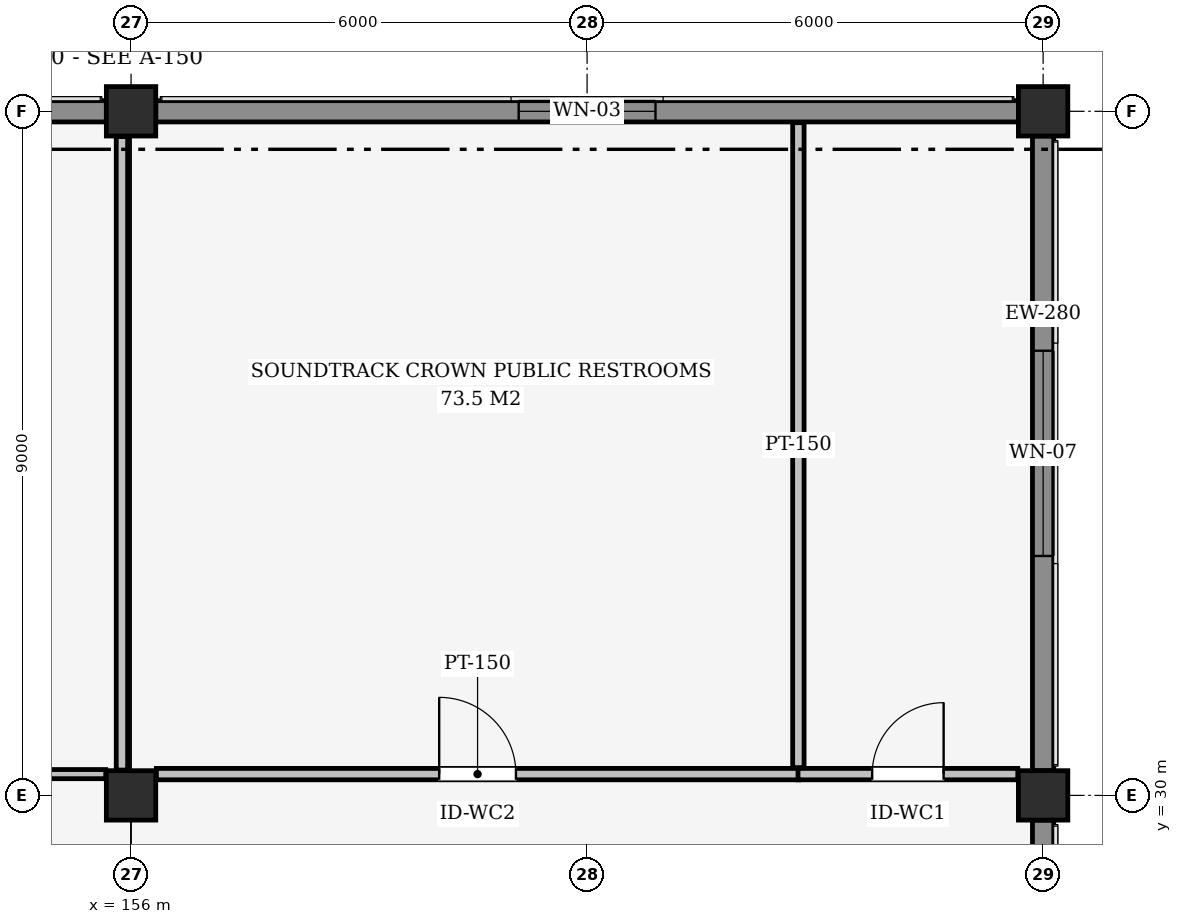
"""IFC4 building model, lengths in metres.
Left out: names, types, materials, properties, quantities, classifications, styles, units other than length and angle.
Written with IfcOpenShell. Run it as: python <this file> out.ifc"""

import sys

from ifc_helpers import new_model, si_unit, direction, frame, frame_2d, origin, origin_2d, place, context, subcontext, project, spatial, rectangle, extrude, element, fill, save


model = new_model("IFC4")
c1 = context("Model", 3, precision=1e-05, world=origin(), true_north=direction((0.0, 1.0)))
c2 = subcontext(c1, "Body", "Model", "MODEL_VIEW")
j1 = project(units=[si_unit("LENGTHUNIT", "METRE"), si_unit("PLANEANGLEUNIT", "RADIAN")], contexts=[c1])
p1 = place(None, origin())
s1 = spatial("IfcSite", under=j1, at=p1, CompositionType="ELEMENT")
p2 = place(p1, origin())
s2 = spatial("IfcBuilding", under=s1, at=p2, CompositionType="ELEMENT")
p3 = place(p2, frame((0.0, 0.0, 18.3)))
s3 = spatial("IfcBuildingStorey", under=s2, at=p3, CompositionType="ELEMENT", Elevation=18.3)
for number, where, z_axis, x_axis in (
    (1, (156.0, 30.0, 0.0), (0.0, 0.0, 1.0), (1.0, 0.0, 0.0)),
    (2, (156.0, 39.0, 0.0), (0.0, 0.0, 1.0), (1.0, 0.0, 0.0)),
    (3, (168.0, 30.0, 0.0), (0.0, 0.0, 1.0), (1.0, 0.0, 0.0)),
    (4, (168.0, 39.0, 0.0), (0.0, 0.0, 1.0), (1.0, 0.0, 0.0)),
):
    element("IfcColumn", number, at=place(p3, frame(where, z_axis=z_axis, x_axis=x_axis)), inside=s3, PredefinedType="COLUMN", context=c2, shape_type="SweptSolid", body=[
        extrude(rectangle(XDim=0.65, YDim=0.65, at=origin_2d()), origin(), (0.0, 0.0, 1.0), 3.9),
    ])
p4 = place(p3, frame((144.325, 39.0, 0.0), z_axis=(0.0, 0.0, 1.0), x_axis=(1.0, 0.0, 0.0)))
e5 = element("IfcWall", 5, at=p4, inside=s3, PredefinedType="SOLIDWALL", context=c2, shape_type="SweptSolid", body=[
    extrude(rectangle(XDim=11.35, YDim=0.28, at=frame_2d((5.675, 0.0))), origin(), (0.0, 0.0, 1.0), 3.269),
])
p5 = place(p4, frame((2.128, 0.0, 0.85)))
e6 = element("IfcOpeningElement", 6, at=p5, cuts=e5, PredefinedType="OPENING", context=c2, shape_type="SweptSolid", body=[
    extrude(rectangle(XDim=2.1, YDim=1.8, at=frame_2d((1.05, 0.9))), frame((0.0, 0.15, 0.0), z_axis=(0.0, -1.0, 0.0), x_axis=(1.0, 0.0, 0.0)), (0.0, 0.0, 1.0), 0.3),
])
p6 = place(p3, frame((156.325, 39.0, 0.0), z_axis=(0.0, 0.0, 1.0), x_axis=(1.0, 0.0, 0.0)))
e7 = element("IfcWall", 7, at=p6, inside=s3, PredefinedType="SOLIDWALL", context=c2, shape_type="SweptSolid", body=[
    extrude(rectangle(XDim=11.35, YDim=0.28, at=frame_2d((5.675, 0.0))), origin(), (0.0, 0.0, 1.0), 3.269),
])
p7 = place(p6, frame((4.775, 0.0, 0.85)))
e8 = element("IfcOpeningElement", 8, at=p7, cuts=e7, PredefinedType="OPENING", context=c2, shape_type="SweptSolid", body=[
    extrude(rectangle(XDim=1.8, YDim=1.65, at=frame_2d((0.9, 0.825))), frame((0.0, 0.15, 0.0), z_axis=(0.0, -1.0, 0.0), x_axis=(1.0, 0.0, 0.0)), (0.0, 0.0, 1.0), 0.3),
])
p8 = place(p3, frame((168.0, 29.675, 0.0), z_axis=(0.0, 0.0, 1.0), x_axis=(0.0, -1.0, 0.0)))
e9 = element("IfcWall", 9, at=p8, inside=s3, PredefinedType="SOLIDWALL", context=c2, shape_type="SweptSolid", body=[
    extrude(rectangle(XDim=5.35, YDim=0.28, at=frame_2d((2.675, 0.0))), origin(), (0.0, 0.0, 1.0), 3.268),
])
p9 = place(p8, frame((2.0, 0.0, 0.85)))
e10 = element("IfcOpeningElement", 10, at=p9, cuts=e9, PredefinedType="OPENING", context=c2, shape_type="SweptSolid", body=[
    extrude(rectangle(XDim=1.35, YDim=1.5, at=frame_2d((0.675, 0.75))), frame((0.0, 0.15, 0.0), z_axis=(0.0, -1.0, 0.0), x_axis=(1.0, 0.0, 0.0)), (0.0, 0.0, 1.0), 0.3),
])
p10 = place(p3, frame((168.0, 38.675, 0.0), z_axis=(0.0, 0.0, 1.0), x_axis=(0.0, -1.0, 0.0)))
e11 = element("IfcWall", 11, at=p10, inside=s3, PredefinedType="SOLIDWALL", context=c2, shape_type="SweptSolid", body=[
    extrude(rectangle(XDim=8.35, YDim=0.28, at=frame_2d((4.175, 0.0))), origin(), (0.0, 0.0, 1.0), 3.269),
])
p11 = place(p10, frame((2.825, 0.0, 0.85)))
e12 = element("IfcOpeningElement", 12, at=p11, cuts=e11, PredefinedType="OPENING", context=c2, shape_type="SweptSolid", body=[
    extrude(rectangle(XDim=2.7, YDim=1.95, at=frame_2d((1.35, 0.975))), frame((0.0, 0.15, 0.0), z_axis=(0.0, -1.0, 0.0), x_axis=(1.0, 0.0, 0.0)), (0.0, 0.0, 1.0), 0.3),
])
p12 = place(p3, frame((144.333, 30.28, 0.0), z_axis=(0.0, 0.0, 1.0), x_axis=(1.0, 0.0, 0.0)))
e13 = element("IfcWall", 13, at=p12, inside=s3, PredefinedType="PARTITIONING", context=c2, shape_type="SweptSolid", body=[
    extrude(rectangle(XDim=11.334, YDim=0.12, at=frame_2d((5.667, 0.0))), origin(), (0.0, 0.0, 1.0), 3.269),
])
p13 = place(p3, frame((156.333, 30.28, 0.0), z_axis=(0.0, 0.0, 1.0), x_axis=(1.0, 0.0, 0.0)))
e14 = element("IfcWall", 14, at=p13, inside=s3, PredefinedType="PARTITIONING", context=c2, shape_type="SweptSolid", body=[
    extrude(rectangle(XDim=8.452, YDim=0.15, at=frame_2d((4.226, 0.0))), origin(), (0.0, 0.0, 1.0), 3.269),
])
p14 = place(p13, frame((3.721, 0.0, 0.0)))
e15 = element("IfcOpeningElement", 15, at=p14, cuts=e14, PredefinedType="OPENING", context=c2, shape_type="SweptSolid", body=[
    extrude(rectangle(XDim=1.01, YDim=2.1, at=frame_2d((0.505, 1.05))), frame((0.0, 0.085, 0.0), z_axis=(0.0, -1.0, 0.0), x_axis=(1.0, 0.0, 0.0)), (0.0, 0.0, 1.0), 0.17),
])
p15 = place(p3, frame((164.775, 30.28, 0.0), z_axis=(0.0, 0.0, 1.0), x_axis=(1.0, 0.0, 0.0)))
e16 = element("IfcWall", 16, at=p15, inside=s3, PredefinedType="PARTITIONING", context=c2, shape_type="SweptSolid", body=[
    extrude(rectangle(XDim=2.892, YDim=0.15, at=frame_2d((1.446, 0.0))), origin(), (0.0, 0.0, 1.0), 3.269),
])
p16 = place(p15, frame((0.976, 0.0, 0.0)))
e17 = element("IfcOpeningElement", 17, at=p16, cuts=e16, PredefinedType="OPENING", context=c2, shape_type="SweptSolid", body=[
    extrude(rectangle(XDim=0.94, YDim=2.1, at=frame_2d((0.47, 1.05))), frame((0.0, 0.085, 0.0), z_axis=(0.0, -1.0, 0.0), x_axis=(1.0, 0.0, 0.0)), (0.0, 0.0, 1.0), 0.17),
])
p17 = place(p3, frame((155.88, 30.333, 0.0), z_axis=(0.0, 0.0, 1.0), x_axis=(0.0, 1.0, 0.0)))
e18 = element("IfcWall", 18, at=p17, inside=s3, PredefinedType="PARTITIONING", context=c2, shape_type="SweptSolid", body=[
    extrude(rectangle(XDim=8.334, YDim=0.15, at=frame_2d((4.167, 0.0))), origin(), (0.0, 0.0, 1.0), 3.269),
])
p18 = place(p3, frame((164.78, 30.365, 0.0), z_axis=(0.0, 0.0, 1.0), x_axis=(0.0, 1.0, 0.0)))
e19 = element("IfcWall", 19, at=p18, inside=s3, PredefinedType="PARTITIONING", context=c2, shape_type="SweptSolid", body=[
    extrude(rectangle(XDim=8.485, YDim=0.15, at=frame_2d((4.243, 0.0))), origin(), (0.0, 0.0, 1.0), 3.9),
])
p19 = place(p7, origin())
e20 = element("IfcWindow", 20, at=p19, inside=s3, PartitioningType="SINGLE_PANEL", PredefinedType="WINDOW", context=c2, shape_type="SweptSolid", body=[
    extrude(rectangle(XDim=1.8, YDim=1.65, at=frame_2d((0.9, 0.825))), frame((0.0, 0.03, 0.0), z_axis=(0.0, -1.0, 0.0), x_axis=(1.0, 0.0, 0.0)), (0.0, 0.0, 1.0), 0.06),
])
fill(e8, e20)
p20 = place(p11, origin())
e21 = element("IfcWindow", 21, at=p20, inside=s3, PartitioningType="SINGLE_PANEL", PredefinedType="WINDOW", context=c2, shape_type="SweptSolid", body=[
    extrude(rectangle(XDim=2.7, YDim=1.95, at=frame_2d((1.35, 0.975))), frame((0.0, 0.03, 0.0), z_axis=(0.0, -1.0, 0.0), x_axis=(1.0, 0.0, 0.0)), (0.0, 0.0, 1.0), 0.06),
])
fill(e12, e21)
p21 = place(p14, origin())
e22 = element("IfcDoor", 22, at=p21, inside=s3, OperationType="SINGLE_SWING_LEFT", PredefinedType="DOOR", context=c2, shape_type="SweptSolid", body=[
    extrude(rectangle(XDim=1.01, YDim=2.1, at=frame_2d((0.505, 1.05))), frame((0.0, 0.025, 0.0), z_axis=(0.0, -1.0, 0.0), x_axis=(1.0, 0.0, 0.0)), (0.0, 0.0, 1.0), 0.05),
])
fill(e15, e22)
p22 = place(p16, origin())
e23 = element("IfcDoor", 23, at=p22, inside=s3, OperationType="SINGLE_SWING_RIGHT", PredefinedType="DOOR", context=c2, shape_type="SweptSolid", body=[
    extrude(rectangle(XDim=0.94, YDim=2.1, at=frame_2d((0.47, 1.05))), frame((0.0, 0.025, 0.0), z_axis=(0.0, -1.0, 0.0), x_axis=(1.0, 0.0, 0.0)), (0.0, 0.0, 1.0), 0.05),
])
fill(e17, e23)
save(model, sys.argv[1])
